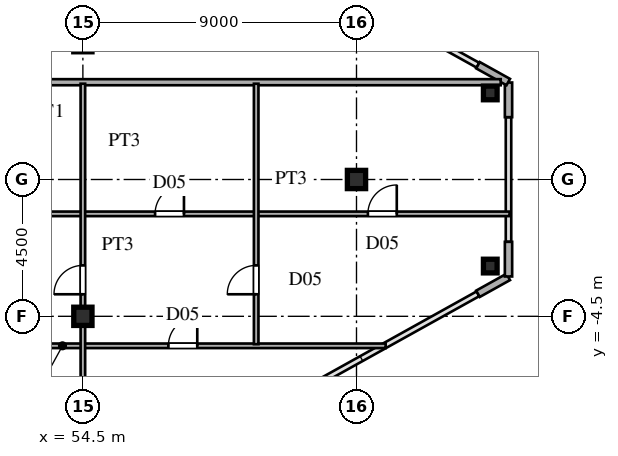
"""IFC4 building model, lengths in metres.
Left out: names, types, materials, properties, quantities, classifications, styles, units other than length and angle.
Written with IfcOpenShell. Run it as: python <this file> out.ifc"""

import sys

from ifc_helpers import new_model, si_unit, direction, frame, frame_2d, origin, origin_2d, place, context, subcontext, project, spatial, rectangle, hollow_rectangle, i_section, extrude, source, transform, mapped, element, fill, save


model = new_model("IFC4")
c1 = context("Model", 3, precision=1e-05, world=origin(), true_north=direction((0.0, 1.0)))
c2 = subcontext(c1, "Body", "Model", "MODEL_VIEW")
j1 = project(units=[si_unit("LENGTHUNIT", "METRE"), si_unit("PLANEANGLEUNIT", "RADIAN")], contexts=[c1])
p1 = place(None, origin())
s1 = spatial("IfcSite", under=j1, at=p1, CompositionType="ELEMENT")
p2 = place(p1, origin())
s2 = spatial("IfcBuilding", under=s1, at=p2, CompositionType="ELEMENT")
p3 = place(p2, frame((0.0, 0.0, 192.3)))
s3 = spatial("IfcBuildingStorey", under=s2, at=p3, CompositionType="ELEMENT", Elevation=192.3)
m1 = source(origin(), c2, "Body", "SweptSolid", [
    extrude(i_section(OverallWidth=0.6, OverallDepth=0.6, WebThickness=0.025, FlangeThickness=0.04, at=origin_2d()), origin(), (0.0, 0.0, 1.0), 3.6),
])
for number, where, z_axis, x_axis in (
    (1, (54.5, -4.5, 0.0), (0.0, 0.0, 1.0), (1.0, 0.0, 0.0)),
    (2, (63.5, 0.0, 0.0), (0.0, 0.0, 1.0), (1.0, 0.0, 0.0)),
):
    element("IfcColumn", number, at=place(p3, frame(where, z_axis=z_axis, x_axis=x_axis)), inside=s3, PredefinedType="COLUMN", context=c2, shape_type="MappedRepresentation", body=[
        mapped(m1, transform((0.0, 0.0, 0.0), scale=1.0)),
    ])
m2 = source(origin(), c2, "Body", "SweptSolid", [
    extrude(hollow_rectangle(XDim=0.45, YDim=0.45, WallThickness=0.018, at=origin_2d()), origin(), (0.0, 0.0, 1.0), 3.6),
])
for number, where, z_axis, x_axis in (
    (3, (67.9, -2.847, 0.0), (0.0, 0.0, 1.0), (1.0, 0.0, 0.0)),
    (4, (67.9, 2.847, 0.0), (0.0, 0.0, 1.0), (1.0, 0.0, 0.0)),
):
    element("IfcColumn", number, at=place(p3, frame(where, z_axis=z_axis, x_axis=x_axis)), inside=s3, PredefinedType="COLUMN", context=c2, shape_type="MappedRepresentation", body=[
        mapped(m2, transform((0.0, 0.0, 0.0), scale=1.0)),
    ])
for number, where, z_axis, x_axis in (
    (5, (67.495, -3.759, 0.0), (0.0, 0.0, 1.0), (0.874, 0.486, 0.0)),
    (6, (68.5, -3.19, 0.0), (0.0, 0.0, 1.0), (0.0, 1.0, 0.0)),
    (7, (68.5, 2.05, 0.0), (0.0, 0.0, 1.0), (0.0, 1.0, 0.0)),
    (8, (68.491, 3.205, 0.0), (0.0, 0.0, 1.0), (-0.874, 0.486, 0.0)),
):
    element("IfcWall", number, at=place(p3, frame(where, z_axis=z_axis, x_axis=x_axis)), inside=s3, PredefinedType="SOLIDWALL", context=c2, shape_type="SweptSolid", body=[
        extrude(rectangle(XDim=1.14, YDim=0.24, at=frame_2d((0.57, 0.0))), origin(), (0.0, 0.0, 1.0), 3.38),
    ])
p4 = place(p3, frame((43.2, -5.47, 0.0), z_axis=(0.0, 0.0, 1.0), x_axis=(1.0, 0.0, 0.0)))
e9 = element("IfcWall", 9, at=p4, inside=s3, PredefinedType="PARTITIONING", context=c2, shape_type="SweptSolid", body=[
    extrude(rectangle(XDim=21.259, YDim=0.15, at=frame_2d((10.629, 0.0))), origin(), (0.0, 0.0, 1.0), 3.38),
])
p5 = place(p4, frame((5.15, 0.0, 0.0)))
e10 = element("IfcOpeningElement", 10, at=p5, cuts=e9, PredefinedType="OPENING", context=c2, shape_type="SweptSolid", body=[
    extrude(rectangle(XDim=0.95, YDim=2.15, at=frame_2d((0.475, 1.075))), frame((0.0, 0.085, 0.0), z_axis=(0.0, -1.0, 0.0), x_axis=(1.0, 0.0, 0.0)), (0.0, 0.0, 1.0), 0.17),
])
p6 = place(p4, frame((14.113, 0.0, 0.0)))
e11 = element("IfcOpeningElement", 11, at=p6, cuts=e9, PredefinedType="OPENING", context=c2, shape_type="SweptSolid", body=[
    extrude(rectangle(XDim=0.95, YDim=2.15, at=frame_2d((0.475, 1.075))), frame((0.0, 0.085, 0.0), z_axis=(0.0, -1.0, 0.0), x_axis=(1.0, 0.0, 0.0)), (0.0, 0.0, 1.0), 0.17),
])
p7 = place(p3, frame((43.2, -1.13, 0.0), z_axis=(0.0, 0.0, 1.0), x_axis=(1.0, 0.0, 0.0)))
e12 = element("IfcWall", 12, at=p7, inside=s3, PredefinedType="PARTITIONING", context=c2, shape_type="SweptSolid", body=[
    extrude(rectangle(XDim=25.335, YDim=0.15, at=frame_2d((12.667, 0.0))), origin(), (0.0, 0.0, 1.0), 3.38),
])
p8 = place(p7, frame((5.15, 0.0, 0.0)))
e13 = element("IfcOpeningElement", 13, at=p8, cuts=e12, PredefinedType="OPENING", context=c2, shape_type="SweptSolid", body=[
    extrude(rectangle(XDim=0.95, YDim=2.15, at=frame_2d((0.475, 1.075))), frame((0.0, 0.085, 0.0), z_axis=(0.0, -1.0, 0.0), x_axis=(1.0, 0.0, 0.0)), (0.0, 0.0, 1.0), 0.17),
])
p9 = place(p7, frame((20.675, 0.0, 0.0)))
e14 = element("IfcOpeningElement", 14, at=p9, cuts=e12, PredefinedType="OPENING", context=c2, shape_type="SweptSolid", body=[
    extrude(rectangle(XDim=0.95, YDim=2.15, at=frame_2d((0.475, 1.075))), frame((0.0, 0.085, 0.0), z_axis=(0.0, -1.0, 0.0), x_axis=(1.0, 0.0, 0.0)), (0.0, 0.0, 1.0), 0.17),
])
p10 = place(p7, frame((13.675, 0.0, 0.0)))
e15 = element("IfcOpeningElement", 15, at=p10, cuts=e12, PredefinedType="OPENING", context=c2, shape_type="SweptSolid", body=[
    extrude(rectangle(XDim=0.95, YDim=2.15, at=frame_2d((0.475, 1.075))), frame((0.0, 0.085, 0.0), z_axis=(0.0, -1.0, 0.0), x_axis=(1.0, 0.0, 0.0)), (0.0, 0.0, 1.0), 0.17),
])
p11 = place(p3, frame((38.48, 3.2, 0.0), z_axis=(0.0, 0.0, 1.0), x_axis=(1.0, 0.0, 0.0)))
e16 = element("IfcWall", 16, at=p11, inside=s3, PredefinedType="PARTITIONING", context=c2, shape_type="SweptSolid", body=[
    extrude(rectangle(XDim=29.763, YDim=0.2, at=frame_2d((14.881, 0.0))), origin(), (0.0, 0.0, 1.0), 3.38),
])
p12 = place(p3, frame((54.5, -9.75, 0.0), z_axis=(0.0, 0.0, 1.0), x_axis=(0.0, 1.0, 0.0)))
e17 = element("IfcWall", 17, at=p12, inside=s3, PredefinedType="PARTITIONING", context=c2, shape_type="SweptSolid", body=[
    extrude(rectangle(XDim=12.9, YDim=0.15, at=frame_2d((6.45, 0.0))), origin(), (0.0, 0.0, 1.0), 2.78),
])
p13 = place(p12, frame((5.975, 0.0, 0.0)))
e18 = element("IfcOpeningElement", 18, at=p13, cuts=e17, PredefinedType="OPENING", context=c2, shape_type="SweptSolid", body=[
    extrude(rectangle(XDim=0.95, YDim=2.15, at=frame_2d((0.475, 1.075))), frame((0.0, 0.085, 0.0), z_axis=(0.0, -1.0, 0.0), x_axis=(1.0, 0.0, 0.0)), (0.0, 0.0, 1.0), 0.17),
])
p14 = place(p3, frame((60.2, -5.417, 0.0), z_axis=(0.0, 0.0, 1.0), x_axis=(0.0, 1.0, 0.0)))
e19 = element("IfcWall", 19, at=p14, inside=s3, PredefinedType="PARTITIONING", context=c2, shape_type="SweptSolid", body=[
    extrude(rectangle(XDim=8.567, YDim=0.15, at=frame_2d((4.283, 0.0))), origin(), (0.0, 0.0, 1.0), 3.38),
])
p15 = place(p14, frame((1.642, 0.0, 0.0)))
e20 = element("IfcOpeningElement", 20, at=p15, cuts=e19, PredefinedType="OPENING", context=c2, shape_type="SweptSolid", body=[
    extrude(rectangle(XDim=0.95, YDim=2.15, at=frame_2d((0.475, 1.075))), frame((0.0, 0.085, 0.0), z_axis=(0.0, -1.0, 0.0), x_axis=(1.0, 0.0, 0.0)), (0.0, 0.0, 1.0), 0.17),
])
m3 = source(origin(), c2, "Body", "SweptSolid", [
    extrude(rectangle(XDim=0.95, YDim=2.15, at=frame_2d((0.475, 1.075))), frame((0.0, 0.025, 0.0), z_axis=(0.0, -1.0, 0.0), x_axis=(1.0, 0.0, 0.0)), (0.0, 0.0, 1.0), 0.05),
])
p16 = place(p6, origin())
e21 = element("IfcDoor", 21, at=p16, inside=s3, OperationType="SINGLE_SWING_RIGHT", PredefinedType="DOOR", context=c2, shape_type="MappedRepresentation", body=[
    mapped(m3, transform((0.0, 0.0, 0.0), scale=1.0)),
])
fill(e11, e21)
p17 = place(p9, origin())
e22 = element("IfcDoor", 22, at=p17, inside=s3, OperationType="SINGLE_SWING_RIGHT", PredefinedType="DOOR", context=c2, shape_type="MappedRepresentation", body=[
    mapped(m3, transform((0.0, 0.0, 0.0), scale=1.0)),
])
fill(e14, e22)
p18 = place(p10, origin())
e23 = element("IfcDoor", 23, at=p18, inside=s3, OperationType="SINGLE_SWING_RIGHT", PredefinedType="DOOR", context=c2, shape_type="MappedRepresentation", body=[
    mapped(m3, transform((0.0, 0.0, 0.0), scale=1.0)),
])
fill(e15, e23)
p19 = place(p13, origin())
e24 = element("IfcDoor", 24, at=p19, inside=s3, OperationType="SINGLE_SWING_LEFT", PredefinedType="DOOR", context=c2, shape_type="MappedRepresentation", body=[
    mapped(m3, transform((0.0, 0.0, 0.0), scale=1.0)),
])
fill(e18, e24)
p20 = place(p15, origin())
e25 = element("IfcDoor", 25, at=p20, inside=s3, OperationType="SINGLE_SWING_LEFT", PredefinedType="DOOR", context=c2, shape_type="MappedRepresentation", body=[
    mapped(m3, transform((0.0, 0.0, 0.0), scale=1.0)),
])
fill(e20, e25)
save(model, sys.argv[1])
